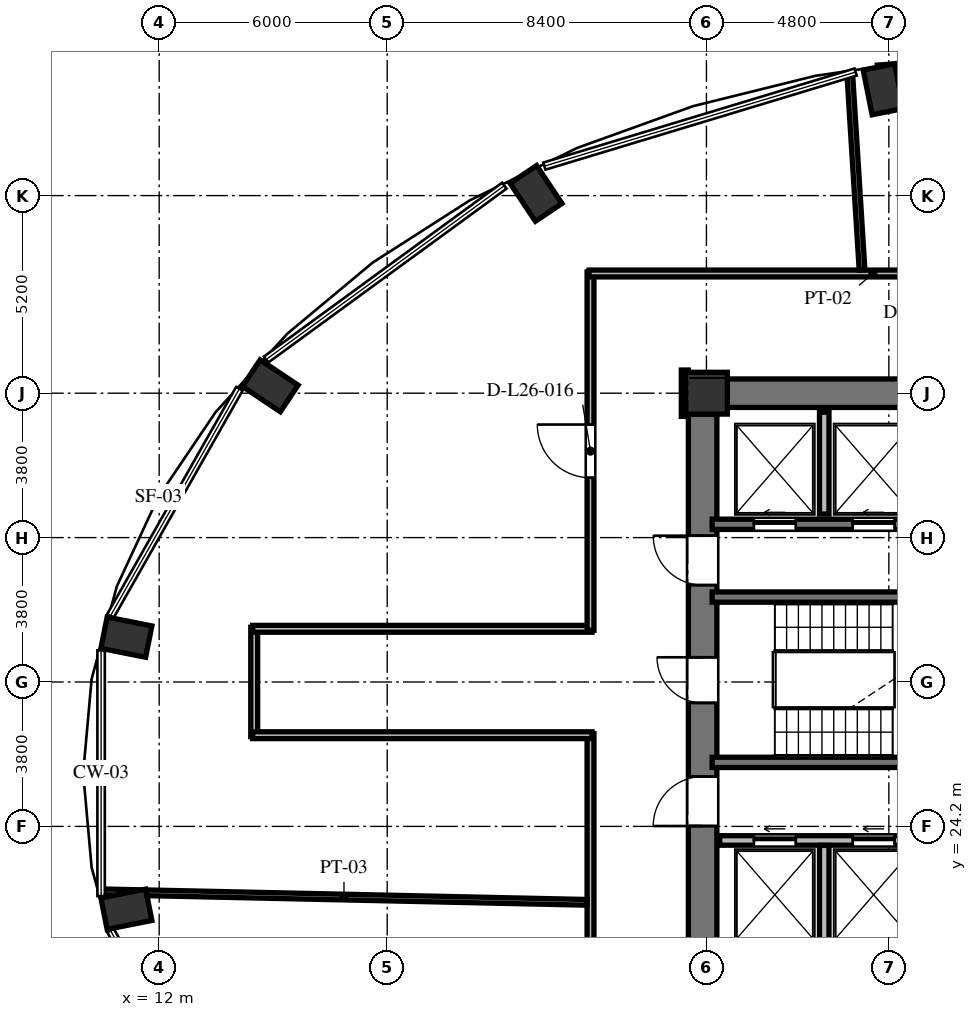
"""IFC4 building model, lengths in metres.
Left out: names, types, materials, properties, quantities, classifications, styles, units other than length and angle.
Written with IfcOpenShell. Run it as: python <this file> out.ifc"""

import sys

from ifc_helpers import new_model, si_unit, direction, frame, frame_2d, origin, origin_2d, place, context, subcontext, project, spatial, rectangle, extrude, element, fill, save


model = new_model("IFC4")
c1 = context("Model", 3, precision=1e-05, world=origin(), true_north=direction((0.0, 1.0)))
c2 = subcontext(c1, "Body", "Model", "MODEL_VIEW")
j1 = project(units=[si_unit("LENGTHUNIT", "METRE"), si_unit("PLANEANGLEUNIT", "RADIAN")], contexts=[c1])
p1 = place(None, origin())
s1 = spatial("IfcSite", under=j1, at=p1, CompositionType="ELEMENT")
p2 = place(p1, origin())
s2 = spatial("IfcBuilding", under=s1, at=p2, CompositionType="ELEMENT")
p3 = place(p2, frame((0.0, 0.0, 103.632)))
s3 = spatial("IfcBuildingStorey", under=s2, at=p3, CompositionType="ELEMENT", Elevation=103.632)
for number, where, z_axis, x_axis in (
    (1, (31.054, 43.597, 0.0), (0.0, 0.0, 1.0), (-0.195, 0.981, 0.0)),
    (2, (21.916, 40.857, 0.0), (0.0, 0.0, 1.0), (-0.556, 0.831, 0.0)),
    (3, (14.922, 35.795, 0.0), (0.0, 0.0, 1.0), (-0.831, 0.556, 0.0)),
    (4, (11.137, 29.18, 0.0), (0.0, 0.0, 1.0), (-0.981, 0.195, 0.0)),
    (5, (11.137, 22.02, 0.0), (0.0, 0.0, 1.0), (-0.981, -0.195, 0.0)),
):
    element("IfcColumn", number, at=place(p3, frame(where, z_axis=z_axis, x_axis=x_axis)), inside=s3, PredefinedType="COLUMN", context=c2, shape_type="SweptSolid", body=[
        extrude(rectangle(XDim=1.2, YDim=0.84, at=origin_2d()), origin(), (0.0, 0.0, 1.0), 3.648),
    ])
p4 = place(p3, frame((26.4, 35.6, 0.0), z_axis=(0.0, 0.0, 1.0), x_axis=(1.0, 0.0, 0.0)))
e6 = element("IfcColumn", 6, at=p4, inside=s3, PredefinedType="COLUMN", context=c2, shape_type="SweptSolid", body=[
    extrude(rectangle(XDim=1.1, YDim=1.1, at=origin_2d()), origin(), (0.0, 0.0, 1.0), 3.648),
])
p5 = place(p3, frame((26.3, 20.95, 0.0), z_axis=(0.0, 0.0, 1.0), x_axis=(0.0, 1.0, 0.0)))
e7 = element("IfcWall", 7, at=p5, inside=s3, PredefinedType="SHEAR", context=c2, shape_type="SweptSolid", body=[
    extrude(rectangle(XDim=14.1, YDim=0.75, at=frame_2d((7.05, 0.0))), origin(), (0.0, 0.0, 1.0), 3.648),
])
p6 = place(p5, frame((6.5, 0.0, 0.0)))
e8 = element("IfcOpeningElement", 8, at=p6, cuts=e7, PredefinedType="OPENING", context=c2, shape_type="SweptSolid", body=[
    extrude(rectangle(XDim=1.2, YDim=2.15, at=frame_2d((0.6, 1.075))), frame((0.0, 0.385, 0.0), z_axis=(0.0, -1.0, 0.0), x_axis=(1.0, 0.0, 0.0)), (0.0, 0.0, 1.0), 0.77),
])
p7 = place(p5, frame((9.6, 0.0, 0.0)))
e9 = element("IfcOpeningElement", 9, at=p7, cuts=e7, PredefinedType="OPENING", context=c2, shape_type="SweptSolid", body=[
    extrude(rectangle(XDim=1.3, YDim=2.2, at=frame_2d((0.65, 1.1))), frame((0.0, 0.385, 0.0), z_axis=(0.0, -1.0, 0.0), x_axis=(1.0, 0.0, 0.0)), (0.0, 0.0, 1.0), 0.77),
])
p8 = place(p5, frame((3.26, 0.0, 0.0)))
e10 = element("IfcOpeningElement", 10, at=p8, cuts=e7, PredefinedType="OPENING", context=c2, shape_type="SweptSolid", body=[
    extrude(rectangle(XDim=1.3, YDim=2.2, at=frame_2d((0.65, 1.1))), frame((0.0, 0.385, 0.0), z_axis=(0.0, -1.0, 0.0), x_axis=(1.0, 0.0, 0.0)), (0.0, 0.0, 1.0), 0.77),
])
p9 = place(p3, frame((26.95, 35.6, 0.0), z_axis=(0.0, 0.0, 1.0), x_axis=(1.0, 0.0, 0.0)))
e11 = element("IfcWall", 11, at=p9, inside=s3, PredefinedType="SHEAR", context=c2, shape_type="SweptSolid", body=[
    extrude(rectangle(XDim=5.375, YDim=0.75, at=frame_2d((2.688, 0.0))), origin(), (0.0, 0.0, 1.0), 3.648),
])
p10 = place(p3, frame((36.179, 44.453, 0.0), z_axis=(0.0, 0.0, 1.0), x_axis=(-0.997431890304, -0.071621394884, 0.0)))
e12 = element("IfcWall", 12, at=p10, inside=s3, PredefinedType="SOLIDWALL", context=c2, shape_type="SweptSolid", body=[
    extrude(rectangle(XDim=5.284, YDim=0.32, at=frame_2d((2.642, 0.0))), origin(), (0.0, 0.0, 1.0), 3.428),
])
p11 = place(p10, frame((2.042, 0.0, 0.85)))
e13 = element("IfcOpeningElement", 13, at=p11, cuts=e12, PredefinedType="OPENING", context=c2, shape_type="SweptSolid", body=[
    extrude(rectangle(XDim=1.2, YDim=1.8, at=frame_2d((0.6, 0.9))), frame((0.0, 0.17, 0.0), z_axis=(0.0, -1.0, 0.0), x_axis=(1.0, 0.0, 0.0)), (0.0, 0.0, 1.0), 0.34),
])
for number, where, z_axis, x_axis in (
    (14, (26.55, 30.235, 0.0), (0.0, 0.0, 1.0), (1.0, 0.0, 0.0)),
    (15, (26.55, 25.885, 0.0), (0.0, 0.0, 1.0), (1.0, 0.0, 0.0)),
):
    element("IfcWall", number, at=place(p3, frame(where, z_axis=z_axis, x_axis=x_axis)), inside=s3, PredefinedType="SHEAR", context=c2, shape_type="SweptSolid", body=[
        extrude(rectangle(XDim=7.985, YDim=0.27, at=frame_2d((3.992, 0.0))), origin(), (0.0, 0.0, 1.0), 3.648),
    ])
p12 = place(p3, frame((26.55, 32.15, 0.0), z_axis=(0.0, 0.0, 1.0), x_axis=(1.0, 0.0, 0.0)))
e16 = element("IfcWall", 16, at=p12, inside=s3, PredefinedType="SHEAR", context=c2, shape_type="SweptSolid", body=[
    extrude(rectangle(XDim=16.4, YDim=0.27, at=frame_2d((8.2, 0.0))), origin(), (0.0, 0.0, 1.0), 3.648),
])
p13 = place(p12, frame((1.1, 0.0, 0.0)))
e17 = element("IfcOpeningElement", 17, at=p13, cuts=e16, PredefinedType="OPENING", context=c2, shape_type="SweptSolid", body=[
    extrude(rectangle(XDim=1.1, YDim=2.2, at=frame_2d((0.55, 1.1))), frame((0.0, 0.145, 0.0), z_axis=(0.0, -1.0, 0.0), x_axis=(1.0, 0.0, 0.0)), (0.0, 0.0, 1.0), 0.29),
])
p14 = place(p12, frame((3.7, 0.0, 0.0)))
e18 = element("IfcOpeningElement", 18, at=p14, cuts=e16, PredefinedType="OPENING", context=c2, shape_type="SweptSolid", body=[
    extrude(rectangle(XDim=1.1, YDim=2.2, at=frame_2d((0.55, 1.1))), frame((0.0, 0.145, 0.0), z_axis=(0.0, -1.0, 0.0), x_axis=(1.0, 0.0, 0.0)), (0.0, 0.0, 1.0), 0.29),
])
p15 = place(p12, frame((6.5, 0.0, 0.0)))
e19 = element("IfcOpeningElement", 19, at=p15, cuts=e16, PredefinedType="OPENING", context=c2, shape_type="SweptSolid", body=[
    extrude(rectangle(XDim=1.1, YDim=2.2, at=frame_2d((0.55, 1.1))), frame((0.0, 0.145, 0.0), z_axis=(0.0, -1.0, 0.0), x_axis=(1.0, 0.0, 0.0)), (0.0, 0.0, 1.0), 0.29),
])
p16 = place(p12, frame((9.1, 0.0, 0.0)))
e20 = element("IfcOpeningElement", 20, at=p16, cuts=e16, PredefinedType="OPENING", context=c2, shape_type="SweptSolid", body=[
    extrude(rectangle(XDim=1.1, YDim=2.2, at=frame_2d((0.55, 1.1))), frame((0.0, 0.145, 0.0), z_axis=(0.0, -1.0, 0.0), x_axis=(1.0, 0.0, 0.0)), (0.0, 0.0, 1.0), 0.29),
])
p17 = place(p12, frame((11.9, 0.0, 0.0)))
e21 = element("IfcOpeningElement", 21, at=p17, cuts=e16, PredefinedType="OPENING", context=c2, shape_type="SweptSolid", body=[
    extrude(rectangle(XDim=1.1, YDim=2.2, at=frame_2d((0.55, 1.1))), frame((0.0, 0.145, 0.0), z_axis=(0.0, -1.0, 0.0), x_axis=(1.0, 0.0, 0.0)), (0.0, 0.0, 1.0), 0.29),
])
p18 = place(p12, frame((14.5, 0.0, 0.0)))
e22 = element("IfcOpeningElement", 22, at=p18, cuts=e16, PredefinedType="OPENING", context=c2, shape_type="SweptSolid", body=[
    extrude(rectangle(XDim=1.1, YDim=2.2, at=frame_2d((0.55, 1.1))), frame((0.0, 0.145, 0.0), z_axis=(0.0, -1.0, 0.0), x_axis=(1.0, 0.0, 0.0)), (0.0, 0.0, 1.0), 0.29),
])
p19 = place(p3, frame((26.75, 23.83, 0.0), z_axis=(0.0, 0.0, 1.0), x_axis=(1.0, 0.0, 0.0)))
e23 = element("IfcWall", 23, at=p19, inside=s3, PredefinedType="SOLIDWALL", context=c2, shape_type="SweptSolid", body=[
    extrude(rectangle(XDim=16.2, YDim=0.25, at=frame_2d((8.1, 0.0))), origin(), (0.0, 0.0, 1.0), 3.428),
])
p20 = place(p19, frame((0.9, 0.0, 0.0)))
e24 = element("IfcOpeningElement", 24, at=p20, cuts=e23, PredefinedType="OPENING", context=c2, shape_type="SweptSolid", body=[
    extrude(rectangle(XDim=1.1, YDim=2.2, at=frame_2d((0.55, 1.1))), frame((0.0, 0.135, 0.0), z_axis=(0.0, -1.0, 0.0), x_axis=(1.0, 0.0, 0.0)), (0.0, 0.0, 1.0), 0.27),
])
p21 = place(p19, frame((3.5, 0.0, 0.0)))
e25 = element("IfcOpeningElement", 25, at=p21, cuts=e23, PredefinedType="OPENING", context=c2, shape_type="SweptSolid", body=[
    extrude(rectangle(XDim=1.1, YDim=2.2, at=frame_2d((0.55, 1.1))), frame((0.0, 0.135, 0.0), z_axis=(0.0, -1.0, 0.0), x_axis=(1.0, 0.0, 0.0)), (0.0, 0.0, 1.0), 0.27),
])
p22 = place(p19, frame((6.3, 0.0, 0.0)))
e26 = element("IfcOpeningElement", 26, at=p22, cuts=e23, PredefinedType="OPENING", context=c2, shape_type="SweptSolid", body=[
    extrude(rectangle(XDim=1.1, YDim=2.2, at=frame_2d((0.55, 1.1))), frame((0.0, 0.135, 0.0), z_axis=(0.0, -1.0, 0.0), x_axis=(1.0, 0.0, 0.0)), (0.0, 0.0, 1.0), 0.27),
])
p23 = place(p19, frame((8.9, 0.0, 0.0)))
e27 = element("IfcOpeningElement", 27, at=p23, cuts=e23, PredefinedType="OPENING", context=c2, shape_type="SweptSolid", body=[
    extrude(rectangle(XDim=1.1, YDim=2.2, at=frame_2d((0.55, 1.1))), frame((0.0, 0.135, 0.0), z_axis=(0.0, -1.0, 0.0), x_axis=(1.0, 0.0, 0.0)), (0.0, 0.0, 1.0), 0.27),
])
p24 = place(p19, frame((11.7, 0.0, 0.0)))
e28 = element("IfcOpeningElement", 28, at=p24, cuts=e23, PredefinedType="OPENING", context=c2, shape_type="SweptSolid", body=[
    extrude(rectangle(XDim=1.1, YDim=2.2, at=frame_2d((0.55, 1.1))), frame((0.0, 0.135, 0.0), z_axis=(0.0, -1.0, 0.0), x_axis=(1.0, 0.0, 0.0)), (0.0, 0.0, 1.0), 0.27),
])
p25 = place(p19, frame((14.15, 0.0, 0.0)))
e29 = element("IfcOpeningElement", 29, at=p25, cuts=e23, PredefinedType="OPENING", context=c2, shape_type="SweptSolid", body=[
    extrude(rectangle(XDim=1.4, YDim=2.3, at=frame_2d((0.7, 1.15))), frame((0.0, 0.135, 0.0), z_axis=(0.0, -1.0, 0.0), x_axis=(1.0, 0.0, 0.0)), (0.0, 0.0, 1.0), 0.27),
])
p26 = place(p3, frame((29.5, 32.42, 0.0), z_axis=(0.0, 0.0, 1.0), x_axis=(0.0, 1.0, 0.0)))
e30 = element("IfcWall", 30, at=p26, inside=s3, PredefinedType="SOLIDWALL", context=c2, shape_type="SweptSolid", body=[
    extrude(rectangle(XDim=2.68, YDim=0.25, at=frame_2d((1.34, 0.0))), origin(), (0.0, 0.0, 1.0), 3.428),
])
p27 = place(p3, frame((29.5, 20.9, 0.0), z_axis=(0.0, 0.0, 1.0), x_axis=(0.0, 1.0, 0.0)))
e31 = element("IfcWall", 31, at=p27, inside=s3, PredefinedType="SOLIDWALL", context=c2, shape_type="SweptSolid", body=[
    extrude(rectangle(XDim=2.8, YDim=0.25, at=frame_2d((1.4, 0.0))), origin(), (0.0, 0.0, 1.0), 3.428),
])
p28 = place(p3, frame((14.5, 26.56, 0.0), z_axis=(0.0, 0.0, 1.0), x_axis=(0.0, 1.0, 0.0)))
e32 = element("IfcWall", 32, at=p28, inside=s3, PredefinedType="PARTITIONING", context=c2, shape_type="SweptSolid", body=[
    extrude(rectangle(XDim=2.88, YDim=0.18, at=frame_2d((1.44, 0.0))), origin(), (0.0, 0.0, 1.0), 3.013),
])
p29 = place(p3, frame((14.46, 29.4, 0.0), z_axis=(0.0, 0.0, 1.0), x_axis=(1.0, 0.0, 0.0)))
e33 = element("IfcWall", 33, at=p29, inside=s3, PredefinedType="PARTITIONING", context=c2, shape_type="SweptSolid", body=[
    extrude(rectangle(XDim=8.93, YDim=0.18, at=frame_2d((4.465, 0.0))), origin(), (0.0, 0.0, 1.0), 3.428),
])
p30 = place(p3, frame((23.35, 29.36, 0.0), z_axis=(0.0, 0.0, 1.0), x_axis=(0.0, 1.0, 0.0)))
e34 = element("IfcWall", 34, at=p30, inside=s3, PredefinedType="PARTITIONING", context=c2, shape_type="SweptSolid", body=[
    extrude(rectangle(XDim=9.43, YDim=0.18, at=frame_2d((4.715, 0.0))), origin(), (0.0, 0.0, 1.0), 3.428),
])
p31 = place(p30, frame((4.015, 0.0, 0.0)))
e35 = element("IfcOpeningElement", 35, at=p31, cuts=e34, PredefinedType="OPENING", context=c2, shape_type="SweptSolid", body=[
    extrude(rectangle(XDim=1.4, YDim=2.2, at=frame_2d((0.7, 1.1))), frame((0.0, 0.1, 0.0), z_axis=(0.0, -1.0, 0.0), x_axis=(1.0, 0.0, 0.0)), (0.0, 0.0, 1.0), 0.2),
])
p32 = place(p3, frame((23.31, 38.75, 0.0), z_axis=(0.0, 0.0, 1.0), x_axis=(1.0, 0.0, 0.0)))
e36 = element("IfcWall", 36, at=p32, inside=s3, PredefinedType="PARTITIONING", context=c2, shape_type="SweptSolid", body=[
    extrude(rectangle(XDim=29.88, YDim=0.18, at=frame_2d((14.94, 0.0))), origin(), (0.0, 0.0, 1.0), 3.053),
])
p33 = place(p32, frame((25.176, 0.0, 0.0)))
e37 = element("IfcOpeningElement", 37, at=p33, cuts=e36, PredefinedType="OPENING", context=c2, shape_type="SweptSolid", body=[
    extrude(rectangle(XDim=1.4, YDim=2.2, at=frame_2d((0.7, 1.1))), frame((0.0, 0.1, 0.0), z_axis=(0.0, -1.0, 0.0), x_axis=(1.0, 0.0, 0.0)), (0.0, 0.0, 1.0), 0.2),
])
p34 = place(p32, frame((18.989, 0.0, 0.0)))
e38 = element("IfcOpeningElement", 38, at=p34, cuts=e36, PredefinedType="OPENING", context=c2, shape_type="SweptSolid", body=[
    extrude(rectangle(XDim=1.4, YDim=2.2, at=frame_2d((0.7, 1.1))), frame((0.0, 0.1, 0.0), z_axis=(0.0, -1.0, 0.0), x_axis=(1.0, 0.0, 0.0)), (0.0, 0.0, 1.0), 0.2),
])
p35 = place(p32, frame((12.589, 0.0, 0.0)))
e39 = element("IfcOpeningElement", 39, at=p35, cuts=e36, PredefinedType="OPENING", context=c2, shape_type="SweptSolid", body=[
    extrude(rectangle(XDim=1.4, YDim=2.2, at=frame_2d((0.7, 1.1))), frame((0.0, 0.1, 0.0), z_axis=(0.0, -1.0, 0.0), x_axis=(1.0, 0.0, 0.0)), (0.0, 0.0, 1.0), 0.2),
])
p36 = place(p32, frame((8.188, 0.0, 0.0)))
e40 = element("IfcOpeningElement", 40, at=p36, cuts=e36, PredefinedType="OPENING", context=c2, shape_type="SweptSolid", body=[
    extrude(rectangle(XDim=1.4, YDim=2.2, at=frame_2d((0.7, 1.1))), frame((0.0, 0.1, 0.0), z_axis=(0.0, -1.0, 0.0), x_axis=(1.0, 0.0, 0.0)), (0.0, 0.0, 1.0), 0.2),
])
p37 = place(p3, frame((25.83, 36.21, 0.0), z_axis=(0.0, 0.0, 1.0), x_axis=(0.0, -1.0, 0.0)))
e41 = element("IfcWall", 41, at=p37, inside=s3, PredefinedType="PARTITIONING", context=c2, shape_type="SweptSolid", body=[
    extrude(rectangle(XDim=1.22, YDim=0.18, at=frame_2d((0.61, 0.0))), origin(), (0.0, 0.0, 1.0), 3.428),
])
p38 = place(p3, frame((23.35, 17.36, 0.0), z_axis=(0.0, 0.0, 1.0), x_axis=(0.0, 1.0, 0.0)))
e42 = element("IfcWall", 42, at=p38, inside=s3, PredefinedType="PARTITIONING", context=c2, shape_type="SweptSolid", body=[
    extrude(rectangle(XDim=9.28, YDim=0.18, at=frame_2d((4.64, 0.0))), origin(), (0.0, 0.0, 1.0), 3.428),
])
p39 = place(p3, frame((23.39, 26.6, 0.0), z_axis=(0.0, 0.0, 1.0), x_axis=(-1.0, 0.0, 0.0)))
e43 = element("IfcWall", 43, at=p39, inside=s3, PredefinedType="PARTITIONING", context=c2, shape_type="SweptSolid", body=[
    extrude(rectangle(XDim=8.93, YDim=0.18, at=frame_2d((4.465, 0.0))), origin(), (0.0, 0.0, 1.0), 3.428),
])
p40 = place(p3, frame((10.465, 22.479, 0.0), z_axis=(0.0, 0.0, 1.0), x_axis=(0.999765147572, -0.021671402821, 0.0)))
e44 = element("IfcWall", 44, at=p40, inside=s3, PredefinedType="PARTITIONING", context=c2, shape_type="SweptSolid", body=[
    extrude(rectangle(XDim=12.798, YDim=0.15, at=frame_2d((6.399, 0.0))), origin(), (0.0, 0.0, 1.0), 3.428),
])
p41 = place(p3, frame((30.495, 38.84, 0.0), z_axis=(0.0, 0.0, 1.0), x_axis=(-0.062595600558, 0.998038972581, 0.0)))
e45 = element("IfcWall", 45, at=p41, inside=s3, PredefinedType="PARTITIONING", context=c2, shape_type="SweptSolid", body=[
    extrude(rectangle(XDim=5.176, YDim=0.15, at=frame_2d((2.588, 0.0))), origin(), (0.0, 0.0, 1.0), 3.428),
])
p42 = place(p6, origin())
e46 = element("IfcDoor", 46, at=p42, inside=s3, OperationType="SINGLE_SWING_RIGHT", PredefinedType="DOOR", context=c2, shape_type="SweptSolid", body=[
    extrude(rectangle(XDim=1.2, YDim=2.15, at=frame_2d((0.6, 1.075))), frame((0.0, 0.025, 0.0), z_axis=(0.0, -1.0, 0.0), x_axis=(1.0, 0.0, 0.0)), (0.0, 0.0, 1.0), 0.05),
])
fill(e8, e46)
p43 = place(p7, origin())
e47 = element("IfcDoor", 47, at=p43, inside=s3, OperationType="SINGLE_SWING_RIGHT", PredefinedType="DOOR", context=c2, shape_type="SweptSolid", body=[
    extrude(rectangle(XDim=1.3, YDim=2.2, at=frame_2d((0.65, 1.1))), frame((0.0, 0.025, 0.0), z_axis=(0.0, -1.0, 0.0), x_axis=(1.0, 0.0, 0.0)), (0.0, 0.0, 1.0), 0.05),
])
fill(e9, e47)
p44 = place(p8, origin())
e48 = element("IfcDoor", 48, at=p44, inside=s3, OperationType="SINGLE_SWING_LEFT", PredefinedType="DOOR", context=c2, shape_type="SweptSolid", body=[
    extrude(rectangle(XDim=1.3, YDim=2.2, at=frame_2d((0.65, 1.1))), frame((0.0, 0.025, 0.0), z_axis=(0.0, -1.0, 0.0), x_axis=(1.0, 0.0, 0.0)), (0.0, 0.0, 1.0), 0.05),
])
fill(e10, e48)
p45 = place(p13, origin())
e49 = element("IfcDoor", 49, at=p45, inside=s3, OperationType="SLIDING_TO_LEFT", PredefinedType="DOOR", context=c2, shape_type="SweptSolid", body=[
    extrude(rectangle(XDim=1.1, YDim=2.2, at=frame_2d((0.55, 1.1))), frame((0.0, 0.025, 0.0), z_axis=(0.0, -1.0, 0.0), x_axis=(1.0, 0.0, 0.0)), (0.0, 0.0, 1.0), 0.05),
])
fill(e17, e49)
p46 = place(p14, origin())
e50 = element("IfcDoor", 50, at=p46, inside=s3, OperationType="SLIDING_TO_LEFT", PredefinedType="DOOR", context=c2, shape_type="SweptSolid", body=[
    extrude(rectangle(XDim=1.1, YDim=2.2, at=frame_2d((0.55, 1.1))), frame((0.0, 0.025, 0.0), z_axis=(0.0, -1.0, 0.0), x_axis=(1.0, 0.0, 0.0)), (0.0, 0.0, 1.0), 0.05),
])
fill(e18, e50)
p47 = place(p20, origin())
e51 = element("IfcDoor", 51, at=p47, inside=s3, OperationType="SLIDING_TO_LEFT", PredefinedType="DOOR", context=c2, shape_type="SweptSolid", body=[
    extrude(rectangle(XDim=1.1, YDim=2.2, at=frame_2d((0.55, 1.1))), frame((0.0, 0.025, 0.0), z_axis=(0.0, -1.0, 0.0), x_axis=(1.0, 0.0, 0.0)), (0.0, 0.0, 1.0), 0.05),
])
fill(e24, e51)
p48 = place(p21, origin())
e52 = element("IfcDoor", 52, at=p48, inside=s3, OperationType="SLIDING_TO_LEFT", PredefinedType="DOOR", context=c2, shape_type="SweptSolid", body=[
    extrude(rectangle(XDim=1.1, YDim=2.2, at=frame_2d((0.55, 1.1))), frame((0.0, 0.025, 0.0), z_axis=(0.0, -1.0, 0.0), x_axis=(1.0, 0.0, 0.0)), (0.0, 0.0, 1.0), 0.05),
])
fill(e25, e52)
p49 = place(p31, origin())
e53 = element("IfcDoor", 53, at=p49, inside=s3, OperationType="SINGLE_SWING_RIGHT", PredefinedType="DOOR", context=c2, shape_type="SweptSolid", body=[
    extrude(rectangle(XDim=1.4, YDim=2.2, at=frame_2d((0.7, 1.1))), frame((0.0, 0.025, 0.0), z_axis=(0.0, -1.0, 0.0), x_axis=(1.0, 0.0, 0.0)), (0.0, 0.0, 1.0), 0.05),
])
fill(e35, e53)
save(model, sys.argv[1])
